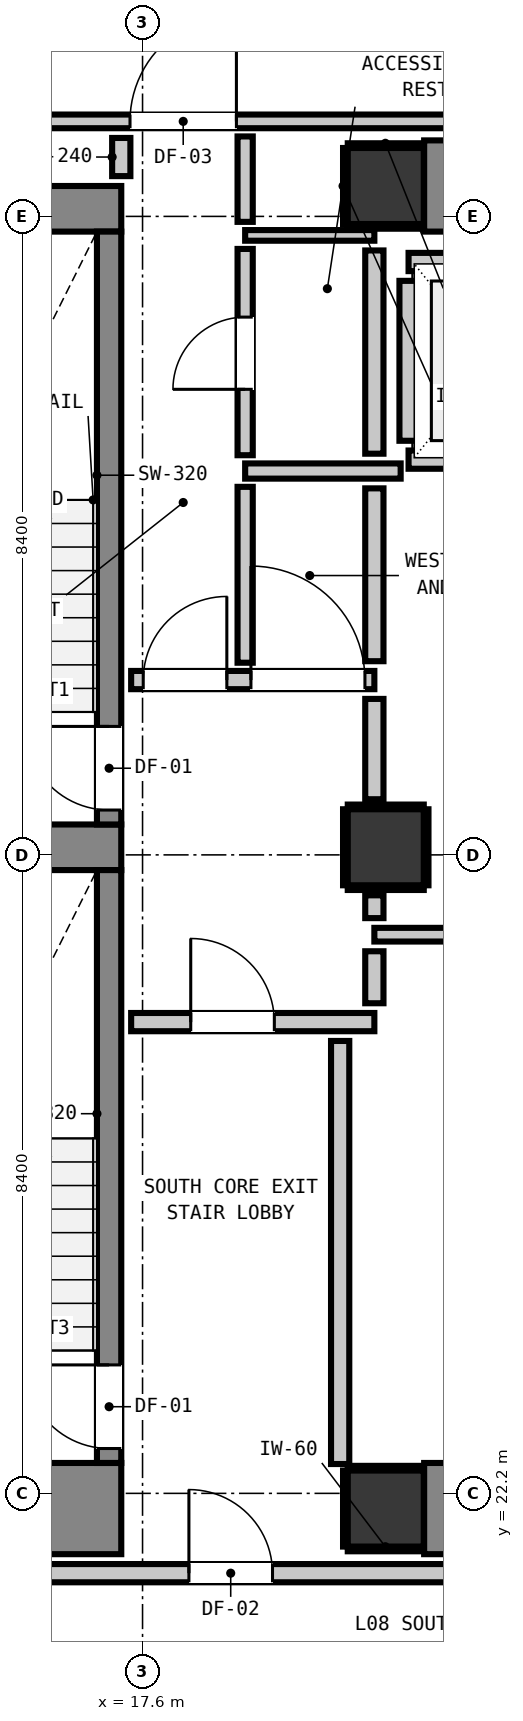
"""IFC4 building model, lengths in metres.
Left out: names, types, materials, properties, quantities, classifications, styles, units other than length and angle.
Written with IfcOpenShell. Run it as: python <this file> out.ifc"""

import sys

from ifc_helpers import new_model, si_unit, direction, frame, frame_2d, origin, origin_2d, place, context, subcontext, project, spatial, rectangle, extrude, element, fill, save


model = new_model("IFC4")
c1 = context("Model", 3, precision=1e-05, world=origin(), true_north=direction((0.0, 1.0)))
c2 = subcontext(c1, "Body", "Model", "MODEL_VIEW")
j1 = project(units=[si_unit("LENGTHUNIT", "METRE"), si_unit("PLANEANGLEUNIT", "RADIAN")], contexts=[c1])
p1 = place(None, origin())
s1 = spatial("IfcSite", under=j1, at=p1, CompositionType="ELEMENT")
p2 = place(p1, origin())
s2 = spatial("IfcBuilding", under=s1, at=p2, CompositionType="ELEMENT")
p3 = place(p2, frame((0.0, 0.0, 31.96)))
s3 = spatial("IfcBuildingStorey", under=s2, at=p3, CompositionType="ELEMENT", Elevation=31.96)
for number, where, z_axis, x_axis in (
    (1, (20.8, 22.0, 0.0), (0.0, 0.0, 1.0), (1.0, 0.0, 0.0)),
    (2, (20.8, 39.4, 0.0), (0.0, 0.0, 1.0), (1.0, 0.0, 0.0)),
):
    element("IfcColumn", number, at=place(p3, frame(where, z_axis=z_axis, x_axis=x_axis)), inside=s3, PredefinedType="COLUMN", context=c2, shape_type="SweptSolid", body=[
        extrude(rectangle(XDim=1.0, YDim=1.0, at=origin_2d()), origin(), (0.0, 0.0, 1.0), 3.32),
    ])
p4 = place(p3, frame((13.24, 22.0, 0.0), z_axis=(0.0, 0.0, 1.0), x_axis=(1.0, 0.0, 0.0)))
e3 = element("IfcWall", 3, at=p4, inside=s3, PredefinedType="SHEAR", context=c2, shape_type="SweptSolid", body=[
    extrude(rectangle(XDim=4.08, YDim=1.2, at=frame_2d((2.04, 0.0))), origin(), (0.0, 0.0, 1.0), 3.32),
])
p5 = place(p3, frame((13.24, 39.1, 0.0), z_axis=(0.0, 0.0, 1.0), x_axis=(1.0, 0.0, 0.0)))
e4 = element("IfcWall", 4, at=p5, inside=s3, PredefinedType="SHEAR", context=c2, shape_type="SweptSolid", body=[
    extrude(rectangle(XDim=4.08, YDim=0.6, at=frame_2d((2.04, 0.0))), origin(), (0.0, 0.0, 1.0), 3.32),
])
p6 = place(p3, frame((13.905, 30.7, 0.0), z_axis=(0.0, 0.0, 1.0), x_axis=(1.0, 0.0, 0.0)))
e5 = element("IfcWall", 5, at=p6, inside=s3, PredefinedType="SHEAR", context=c2, shape_type="SweptSolid", body=[
    extrude(rectangle(XDim=3.415, YDim=0.6, at=frame_2d((1.708, 0.0))), origin(), (0.0, 0.0, 1.0), 3.32),
])
for number, where, z_axis, x_axis in (
    (6, (21.305, 22.0, 0.0), (0.0, 0.0, 1.0), (1.0, 0.0, 0.0)),
    (7, (21.305, 39.4, 0.0), (0.0, 0.0, 1.0), (1.0, 0.0, 0.0)),
):
    element("IfcWall", number, at=place(p3, frame(where, z_axis=z_axis, x_axis=x_axis)), inside=s3, PredefinedType="SHEAR", context=c2, shape_type="SweptSolid", body=[
        extrude(rectangle(XDim=7.39, YDim=1.2, at=frame_2d((3.695, 0.0))), origin(), (0.0, 0.0, 1.0), 3.32),
    ])
p7 = place(p3, frame((17.16, 31.0, 0.0), z_axis=(0.0, 0.0, 1.0), x_axis=(0.0, 1.0, 0.0)))
e8 = element("IfcWall", 8, at=p7, inside=s3, PredefinedType="SHEAR", context=c2, shape_type="SweptSolid", body=[
    extrude(rectangle(XDim=7.8, YDim=0.32, at=frame_2d((3.9, 0.0))), origin(), (0.0, 0.0, 1.0), 3.32),
])
p8 = place(p7, frame((0.19, 0.0, 0.0)))
e9 = element("IfcOpeningElement", 9, at=p8, cuts=e8, PredefinedType="OPENING", context=c2, shape_type="SweptSolid", body=[
    extrude(rectangle(XDim=1.1, YDim=2.15, at=frame_2d((0.55, 1.075))), frame((0.0, 0.17, 0.0), z_axis=(0.0, -1.0, 0.0), x_axis=(1.0, 0.0, 0.0)), (0.0, 0.0, 1.0), 0.34),
])
p9 = place(p3, frame((17.16, 22.6, 0.0), z_axis=(0.0, 0.0, 1.0), x_axis=(0.0, 1.0, 0.0)))
e10 = element("IfcWall", 10, at=p9, inside=s3, PredefinedType="SHEAR", context=c2, shape_type="SweptSolid", body=[
    extrude(rectangle(XDim=7.8, YDim=0.32, at=frame_2d((3.9, 0.0))), origin(), (0.0, 0.0, 1.0), 3.32),
])
p10 = place(p9, frame((0.19, 0.0, 0.0)))
e11 = element("IfcOpeningElement", 11, at=p10, cuts=e10, PredefinedType="OPENING", context=c2, shape_type="SweptSolid", body=[
    extrude(rectangle(XDim=1.1, YDim=2.15, at=frame_2d((0.55, 1.075))), frame((0.0, 0.17, 0.0), z_axis=(0.0, -1.0, 0.0), x_axis=(1.0, 0.0, 0.0)), (0.0, 0.0, 1.0), 0.34),
])
p11 = place(p3, frame((20.8, 30.7, 0.0), z_axis=(0.0, 0.0, 1.0), x_axis=(1.0, 0.0, 0.0)))
e12 = element("IfcColumn", 12, at=p11, inside=s3, PredefinedType="COLUMN", context=c2, shape_type="SweptSolid", body=[
    extrude(rectangle(XDim=1.0, YDim=1.0, at=origin_2d()), origin(), (0.0, 0.0, 1.0), 3.32),
])
for number, where, z_axis, x_axis in (
    (13, (21.1, 35.8, 0.0), (0.0, 0.0, 1.0), (1.0, 0.0, 0.0)),
    (14, (21.1, 38.4, 0.0), (0.0, 0.0, 1.0), (1.0, 0.0, 0.0)),
):
    element("IfcWall", number, at=place(p3, frame(where, z_axis=z_axis, x_axis=x_axis)), inside=s3, PredefinedType="PARTITIONING", context=c2, shape_type="SweptSolid", body=[
        extrude(rectangle(XDim=2.2, YDim=0.24, at=frame_2d((1.1, 0.0))), origin(), (0.0, 0.0, 1.0), 3.06),
    ])
p12 = place(p3, frame((21.1, 36.048, 0.0), z_axis=(0.0, 0.0, 1.0), x_axis=(0.0, 1.0, 0.0)))
e15 = element("IfcWall", 15, at=p12, inside=s3, PredefinedType="PARTITIONING", context=c2, shape_type="SweptSolid", body=[
    extrude(rectangle(XDim=2.104, YDim=0.24, at=frame_2d((1.052, 0.0))), origin(), (0.0, 0.0, 1.0), 2.295),
])
p13 = place(p3, frame((1.827, 21.15, 0.0), z_axis=(0.0, 0.0, 1.0), x_axis=(1.0, 0.0, 0.0)))
e16 = element("IfcWall", 16, at=p13, inside=s3, PredefinedType="PARTITIONING", context=c2, shape_type="SweptSolid", body=[
    extrude(rectangle(XDim=42.146, YDim=0.24, at=frame_2d((21.073, 0.0))), origin(), (0.0, 0.0, 1.0), 3.06),
])
p14 = place(p13, frame((16.383, 0.0, 0.0)))
e17 = element("IfcOpeningElement", 17, at=p14, cuts=e16, PredefinedType="OPENING", context=c2, shape_type="SweptSolid", body=[
    extrude(rectangle(XDim=1.1, YDim=2.15, at=frame_2d((0.55, 1.075))), frame((0.0, 0.13, 0.0), z_axis=(0.0, -1.0, 0.0), x_axis=(1.0, 0.0, 0.0)), (0.0, 0.0, 1.0), 0.26),
])
p15 = place(p13, frame((8.647, 0.0, 0.0)))
e18 = element("IfcOpeningElement", 18, at=p15, cuts=e16, PredefinedType="OPENING", context=c2, shape_type="SweptSolid", body=[
    extrude(rectangle(XDim=1.4, YDim=2.15, at=frame_2d((0.7, 1.075))), frame((0.0, 0.13, 0.0), z_axis=(0.0, -1.0, 0.0), x_axis=(1.0, 0.0, 0.0)), (0.0, 0.0, 1.0), 0.26),
])
p16 = place(p13, frame((38.574, 0.0, 0.0)))
e19 = element("IfcOpeningElement", 19, at=p16, cuts=e16, PredefinedType="OPENING", context=c2, shape_type="SweptSolid", body=[
    extrude(rectangle(XDim=0.9, YDim=2.1, at=frame_2d((0.45, 1.05))), frame((0.0, 0.13, 0.0), z_axis=(0.0, -1.0, 0.0), x_axis=(1.0, 0.0, 0.0)), (0.0, 0.0, 1.0), 0.26),
])
p17 = place(p3, frame((17.45, 28.4, 0.0), z_axis=(0.0, 0.0, 1.0), x_axis=(1.0, 0.0, 0.0)))
e20 = element("IfcWall", 20, at=p17, inside=s3, PredefinedType="PARTITIONING", context=c2, shape_type="SweptSolid", body=[
    extrude(rectangle(XDim=3.2, YDim=0.24, at=frame_2d((1.6, 0.0))), origin(), (0.0, 0.0, 1.0), 3.06),
])
p18 = place(p17, frame((0.784, 0.0, 0.0)))
e21 = element("IfcOpeningElement", 21, at=p18, cuts=e20, PredefinedType="OPENING", context=c2, shape_type="SweptSolid", body=[
    extrude(rectangle(XDim=1.1, YDim=2.15, at=frame_2d((0.55, 1.075))), frame((0.0, 0.13, 0.0), z_axis=(0.0, -1.0, 0.0), x_axis=(1.0, 0.0, 0.0)), (0.0, 0.0, 1.0), 0.26),
])
p19 = place(p3, frame((17.45, 32.9, 0.0), z_axis=(0.0, 0.0, 1.0), x_axis=(1.0, 0.0, 0.0)))
e22 = element("IfcWall", 22, at=p19, inside=s3, PredefinedType="PARTITIONING", context=c2, shape_type="SweptSolid", body=[
    extrude(rectangle(XDim=3.2, YDim=0.24, at=frame_2d((1.6, 0.0))), origin(), (0.0, 0.0, 1.0), 3.06),
])
p20 = place(p19, frame((0.159, 0.0, 0.0)))
e23 = element("IfcOpeningElement", 23, at=p20, cuts=e22, PredefinedType="OPENING", context=c2, shape_type="SweptSolid", body=[
    extrude(rectangle(XDim=1.1, YDim=2.15, at=frame_2d((0.55, 1.075))), frame((0.0, 0.13, 0.0), z_axis=(0.0, -1.0, 0.0), x_axis=(1.0, 0.0, 0.0)), (0.0, 0.0, 1.0), 0.26),
])
p21 = place(p19, frame((1.576, 0.0, 0.0)))
e24 = element("IfcOpeningElement", 24, at=p21, cuts=e22, PredefinedType="OPENING", context=c2, shape_type="SweptSolid", body=[
    extrude(rectangle(XDim=1.5, YDim=2.15, at=frame_2d((0.75, 1.075))), frame((0.0, 0.13, 0.0), z_axis=(0.0, -1.0, 0.0), x_axis=(1.0, 0.0, 0.0)), (0.0, 0.0, 1.0), 0.26),
])
p22 = place(p3, frame((18.95, 35.65, 0.0), z_axis=(0.0, 0.0, 1.0), x_axis=(1.0, 0.0, 0.0)))
e25 = element("IfcWall", 25, at=p22, inside=s3, PredefinedType="PARTITIONING", context=c2, shape_type="SweptSolid", body=[
    extrude(rectangle(XDim=2.046, YDim=0.2, at=frame_2d((1.023, 0.0))), origin(), (0.0, 0.0, 1.0), 3.06),
])
p23 = place(p3, frame((20.65, 29.55, 0.0), z_axis=(0.0, 0.0, 1.0), x_axis=(1.0, 0.0, 0.0)))
e26 = element("IfcWall", 26, at=p23, inside=s3, PredefinedType="PARTITIONING", context=c2, shape_type="SweptSolid", body=[
    extrude(rectangle(XDim=9.325, YDim=0.18, at=frame_2d((4.663, 0.0))), origin(), (0.0, 0.0, 1.0), 3.06),
])
p24 = place(p3, frame((12.989, 40.25, 0.0), z_axis=(0.0, 0.0, 1.0), x_axis=(1.0, 0.0, 0.0)))
e27 = element("IfcWall", 27, at=p24, inside=s3, PredefinedType="PARTITIONING", context=c2, shape_type="SweptSolid", body=[
    extrude(rectangle(XDim=30.984, YDim=0.18, at=frame_2d((15.492, 0.0))), origin(), (0.0, 0.0, 1.0), 3.06),
])
p25 = place(p24, frame((4.446, 0.0, 0.0)))
e28 = element("IfcOpeningElement", 28, at=p25, cuts=e27, PredefinedType="OPENING", context=c2, shape_type="SweptSolid", body=[
    extrude(rectangle(XDim=1.4, YDim=2.15, at=frame_2d((0.7, 1.075))), frame((0.0, 0.1, 0.0), z_axis=(0.0, -1.0, 0.0), x_axis=(1.0, 0.0, 0.0)), (0.0, 0.0, 1.0), 0.2),
])
p26 = place(p24, frame((27.362, 0.0, 0.0)))
e29 = element("IfcOpeningElement", 29, at=p26, cuts=e27, PredefinedType="OPENING", context=c2, shape_type="SweptSolid", body=[
    extrude(rectangle(XDim=1.0, YDim=2.15, at=frame_2d((0.5, 1.075))), frame((0.0, 0.1, 0.0), z_axis=(0.0, -1.0, 0.0), x_axis=(1.0, 0.0, 0.0)), (0.0, 0.0, 1.0), 0.2),
])
p27 = place(p3, frame((18.95, 38.75, 0.0), z_axis=(0.0, 0.0, 1.0), x_axis=(1.0, 0.0, 0.0)))
e30 = element("IfcWall", 30, at=p27, inside=s3, PredefinedType="PARTITIONING", context=c2, shape_type="SweptSolid", body=[
    extrude(rectangle(XDim=1.7, YDim=0.14, at=frame_2d((0.85, 0.0))), origin(), (0.0, 0.0, 1.0), 3.06),
])
p28 = place(p3, frame((17.32, 39.53, 0.0), z_axis=(0.0, 0.0, 1.0), x_axis=(0.0, 1.0, 0.0)))
e31 = element("IfcWall", 31, at=p28, inside=s3, PredefinedType="PARTITIONING", context=c2, shape_type="SweptSolid", body=[
    extrude(rectangle(XDim=0.502, YDim=0.24, at=frame_2d((0.251, 0.0))), origin(), (0.0, 0.0, 1.0), 3.06),
])
p29 = place(p3, frame((20.2, 22.586, 0.0), z_axis=(0.0, 0.0, 1.0), x_axis=(0.0, 1.0, 0.0)))
e32 = element("IfcWall", 32, at=p29, inside=s3, PredefinedType="PARTITIONING", context=c2, shape_type="SweptSolid", body=[
    extrude(rectangle(XDim=5.566, YDim=0.24, at=frame_2d((2.783, 0.0))), origin(), (0.0, 0.0, 1.0), 3.06),
])
p30 = place(p3, frame((20.65, 28.648, 0.0), z_axis=(0.0, 0.0, 1.0), x_axis=(0.0, 1.0, 0.0)))
e33 = element("IfcWall", 33, at=p30, inside=s3, PredefinedType="PARTITIONING", context=c2, shape_type="SweptSolid", body=[
    extrude(rectangle(XDim=0.684, YDim=0.24, at=frame_2d((0.342, 0.0))), origin(), (0.0, 0.0, 1.0), 2.295),
])
p31 = place(p3, frame((20.65, 29.768, 0.0), z_axis=(0.0, 0.0, 1.0), x_axis=(0.0, 1.0, 0.0)))
e34 = element("IfcWall", 34, at=p31, inside=s3, PredefinedType="PARTITIONING", context=c2, shape_type="SweptSolid", body=[
    extrude(rectangle(XDim=0.3, YDim=0.24, at=frame_2d((0.15, 0.0))), origin(), (0.0, 0.0, 1.0), 2.295),
])
p32 = place(p3, frame((20.65, 31.332, 0.0), z_axis=(0.0, 0.0, 1.0), x_axis=(0.0, 1.0, 0.0)))
e35 = element("IfcWall", 35, at=p32, inside=s3, PredefinedType="PARTITIONING", context=c2, shape_type="SweptSolid", body=[
    extrude(rectangle(XDim=1.32, YDim=0.24, at=frame_2d((0.66, 0.0))), origin(), (0.0, 0.0, 1.0), 2.295),
])
p33 = place(p3, frame((20.65, 33.148, 0.0), z_axis=(0.0, 0.0, 1.0), x_axis=(0.0, 1.0, 0.0)))
e36 = element("IfcWall", 36, at=p33, inside=s3, PredefinedType="PARTITIONING", context=c2, shape_type="SweptSolid", body=[
    extrude(rectangle(XDim=2.274, YDim=0.24, at=frame_2d((1.137, 0.0))), origin(), (0.0, 0.0, 1.0), 2.295),
])
p34 = place(p3, frame((20.65, 35.878, 0.0), z_axis=(0.0, 0.0, 1.0), x_axis=(0.0, 1.0, 0.0)))
e37 = element("IfcWall", 37, at=p34, inside=s3, PredefinedType="PARTITIONING", context=c2, shape_type="SweptSolid", body=[
    extrude(rectangle(XDim=2.674, YDim=0.24, at=frame_2d((1.337, 0.0))), origin(), (0.0, 0.0, 1.0), 2.295),
])
p35 = place(p3, frame((18.95, 33.128, 0.0), z_axis=(0.0, 0.0, 1.0), x_axis=(0.0, 1.0, 0.0)))
e38 = element("IfcWall", 38, at=p35, inside=s3, PredefinedType="PARTITIONING", context=c2, shape_type="SweptSolid", body=[
    extrude(rectangle(XDim=2.314, YDim=0.2, at=frame_2d((1.157, 0.0))), origin(), (0.0, 0.0, 1.0), 3.06),
])
p36 = place(p3, frame((18.95, 35.858, 0.0), z_axis=(0.0, 0.0, 1.0), x_axis=(0.0, 1.0, 0.0)))
e39 = element("IfcWall", 39, at=p36, inside=s3, PredefinedType="PARTITIONING", context=c2, shape_type="SweptSolid", body=[
    extrude(rectangle(XDim=2.714, YDim=0.2, at=frame_2d((1.357, 0.0))), origin(), (0.0, 0.0, 1.0), 3.06),
])
p37 = place(p36, frame((0.867, 0.0, 0.0)))
e40 = element("IfcOpeningElement", 40, at=p37, cuts=e39, PredefinedType="OPENING", context=c2, shape_type="SweptSolid", body=[
    extrude(rectangle(XDim=0.95, YDim=2.1, at=frame_2d((0.475, 1.05))), frame((0.0, 0.11, 0.0), z_axis=(0.0, -1.0, 0.0), x_axis=(1.0, 0.0, 0.0)), (0.0, 0.0, 1.0), 0.22),
])
p38 = place(p3, frame((18.95, 38.928, 0.0), z_axis=(0.0, 0.0, 1.0), x_axis=(0.0, 1.0, 0.0)))
e41 = element("IfcWall", 41, at=p38, inside=s3, PredefinedType="PARTITIONING", context=c2, shape_type="SweptSolid", body=[
    extrude(rectangle(XDim=1.124, YDim=0.2, at=frame_2d((0.562, 0.0))), origin(), (0.0, 0.0, 1.0), 3.06),
])
for number, where, z_axis, x_axis in (
    (42, (20.3, 21.468, 0.0), (0.0, 0.0, 1.0), (1.0, 0.0, 0.0)),
    (43, (20.3, 22.532, 0.0), (0.0, 0.0, 1.0), (1.0, 0.0, 0.0)),
):
    element("IfcWall", number, at=place(p3, frame(where, z_axis=z_axis, x_axis=x_axis)), inside=s3, PredefinedType="PARTITIONING", context=c2, shape_type="SweptSolid", body=[
        extrude(rectangle(XDim=0.99, YDim=0.06, at=frame_2d((0.495, 0.0))), origin(), (0.0, 0.0, 1.0), 1.45),
    ])
p39 = place(p3, frame((20.268, 21.5, 0.0), z_axis=(0.0, 0.0, 1.0), x_axis=(0.0, 1.0, 0.0)))
e44 = element("IfcWall", 44, at=p39, inside=s3, PredefinedType="PARTITIONING", context=c2, shape_type="SweptSolid", body=[
    extrude(rectangle(XDim=1.0, YDim=0.06, at=frame_2d((0.5, 0.0))), origin(), (0.0, 0.0, 1.0), 1.45),
])
for number, where, z_axis, x_axis in (
    (45, (20.3, 38.868, 0.0), (0.0, 0.0, 1.0), (1.0, 0.0, 0.0)),
    (46, (20.3, 39.932, 0.0), (0.0, 0.0, 1.0), (1.0, 0.0, 0.0)),
):
    element("IfcWall", number, at=place(p3, frame(where, z_axis=z_axis, x_axis=x_axis)), inside=s3, PredefinedType="PARTITIONING", context=c2, shape_type="SweptSolid", body=[
        extrude(rectangle(XDim=0.99, YDim=0.06, at=frame_2d((0.495, 0.0))), origin(), (0.0, 0.0, 1.0), 1.45),
    ])
for number, where, z_axis, x_axis in (
    (47, (20.268, 38.9, 0.0), (0.0, 0.0, 1.0), (0.0, 1.0, 0.0)),
    (48, (20.3, 30.168, 0.0), (0.0, 0.0, 1.0), (1.0, 0.0, 0.0)),
    (49, (20.3, 31.232, 0.0), (0.0, 0.0, 1.0), (1.0, 0.0, 0.0)),
    (50, (20.268, 30.2, 0.0), (0.0, 0.0, 1.0), (0.0, 1.0, 0.0)),
    (51, (21.332, 30.2, 0.0), (0.0, 0.0, 1.0), (0.0, 1.0, 0.0)),
):
    element("IfcWall", number, at=place(p3, frame(where, z_axis=z_axis, x_axis=x_axis)), inside=s3, PredefinedType="PARTITIONING", context=c2, shape_type="SweptSolid", body=[
        extrude(rectangle(XDim=1.0, YDim=0.06, at=frame_2d((0.5, 0.0))), origin(), (0.0, 0.0, 1.0), 1.45),
    ])
p40 = place(p8, origin())
e52 = element("IfcDoor", 52, at=p40, inside=s3, OperationType="SINGLE_SWING_RIGHT", PredefinedType="DOOR", context=c2, shape_type="SweptSolid", body=[
    extrude(rectangle(XDim=1.1, YDim=2.15, at=frame_2d((0.55, 1.075))), frame((0.0, 0.025, 0.0), z_axis=(0.0, -1.0, 0.0), x_axis=(1.0, 0.0, 0.0)), (0.0, 0.0, 1.0), 0.05),
])
fill(e9, e52)
p41 = place(p10, origin())
e53 = element("IfcDoor", 53, at=p41, inside=s3, OperationType="SINGLE_SWING_RIGHT", PredefinedType="DOOR", context=c2, shape_type="SweptSolid", body=[
    extrude(rectangle(XDim=1.1, YDim=2.15, at=frame_2d((0.55, 1.075))), frame((0.0, 0.025, 0.0), z_axis=(0.0, -1.0, 0.0), x_axis=(1.0, 0.0, 0.0)), (0.0, 0.0, 1.0), 0.05),
])
fill(e11, e53)
p42 = place(p18, origin())
e54 = element("IfcDoor", 54, at=p42, inside=s3, OperationType="SINGLE_SWING_LEFT", PredefinedType="DOOR", context=c2, shape_type="SweptSolid", body=[
    extrude(rectangle(XDim=1.1, YDim=2.15, at=frame_2d((0.55, 1.075))), frame((0.0, 0.025, 0.0), z_axis=(0.0, -1.0, 0.0), x_axis=(1.0, 0.0, 0.0)), (0.0, 0.0, 1.0), 0.05),
])
fill(e21, e54)
p43 = place(p20, origin())
e55 = element("IfcDoor", 55, at=p43, inside=s3, OperationType="SINGLE_SWING_RIGHT", PredefinedType="DOOR", context=c2, shape_type="SweptSolid", body=[
    extrude(rectangle(XDim=1.1, YDim=2.15, at=frame_2d((0.55, 1.075))), frame((0.0, 0.025, 0.0), z_axis=(0.0, -1.0, 0.0), x_axis=(1.0, 0.0, 0.0)), (0.0, 0.0, 1.0), 0.05),
])
fill(e23, e55)
p44 = place(p14, origin())
e56 = element("IfcDoor", 56, at=p44, inside=s3, OperationType="SINGLE_SWING_LEFT", PredefinedType="DOOR", context=c2, shape_type="SweptSolid", body=[
    extrude(rectangle(XDim=1.1, YDim=2.15, at=frame_2d((0.55, 1.075))), frame((0.0, 0.025, 0.0), z_axis=(0.0, -1.0, 0.0), x_axis=(1.0, 0.0, 0.0)), (0.0, 0.0, 1.0), 0.05),
])
fill(e17, e56)
p45 = place(p25, origin())
e57 = element("IfcDoor", 57, at=p45, inside=s3, OperationType="SINGLE_SWING_RIGHT", PredefinedType="DOOR", context=c2, shape_type="SweptSolid", body=[
    extrude(rectangle(XDim=1.4, YDim=2.15, at=frame_2d((0.7, 1.075))), frame((0.0, 0.025, 0.0), z_axis=(0.0, -1.0, 0.0), x_axis=(1.0, 0.0, 0.0)), (0.0, 0.0, 1.0), 0.05),
])
fill(e28, e57)
p46 = place(p21, origin())
e58 = element("IfcDoor", 58, at=p46, inside=s3, OperationType="SINGLE_SWING_LEFT", PredefinedType="DOOR", context=c2, shape_type="SweptSolid", body=[
    extrude(rectangle(XDim=1.5, YDim=2.15, at=frame_2d((0.75, 1.075))), frame((0.0, 0.025, 0.0), z_axis=(0.0, -1.0, 0.0), x_axis=(1.0, 0.0, 0.0)), (0.0, 0.0, 1.0), 0.05),
])
fill(e24, e58)
p47 = place(p37, origin())
e59 = element("IfcDoor", 59, at=p47, inside=s3, OperationType="SINGLE_SWING_LEFT", PredefinedType="DOOR", context=c2, shape_type="SweptSolid", body=[
    extrude(rectangle(XDim=0.95, YDim=2.1, at=frame_2d((0.475, 1.05))), frame((0.0, 0.025, 0.0), z_axis=(0.0, -1.0, 0.0), x_axis=(1.0, 0.0, 0.0)), (0.0, 0.0, 1.0), 0.05),
])
fill(e40, e59)
save(model, sys.argv[1])
